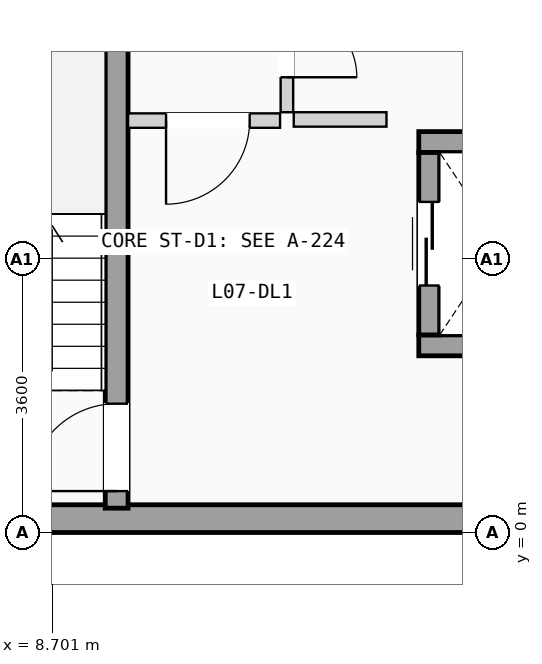
"""IFC4 building model, lengths in metres.
Left out: names, types, materials, properties, quantities, classifications, styles, units other than length and angle.
Written with IfcOpenShell. Run it as: python <this file> out.ifc"""

import sys

from ifc_helpers import new_model, si_unit, direction, frame, frame_2d, origin, place, context, subcontext, project, spatial, rectangle, extrude, element, fill, save


model = new_model("IFC4")
c1 = context("Model", 3, precision=1e-05, world=origin(), true_north=direction((0.0, 1.0)))
c2 = subcontext(c1, "Body", "Model", "MODEL_VIEW")
j1 = project(units=[si_unit("LENGTHUNIT", "METRE"), si_unit("PLANEANGLEUNIT", "RADIAN")], contexts=[c1])
p1 = place(None, origin())
s1 = spatial("IfcSite", under=j1, at=p1, CompositionType="ELEMENT")
p2 = place(p1, origin())
s2 = spatial("IfcBuilding", under=s1, at=p2, CompositionType="ELEMENT")
p3 = place(p2, frame((0.0, 0.0, 24.675)))
s3 = spatial("IfcBuildingStorey", under=s2, at=p3, CompositionType="ELEMENT", Elevation=24.675)
p4 = place(p3, frame((0.0, 0.183, 0.0), z_axis=(0.0, 0.0, 1.0), x_axis=(1.0, 0.0, 0.0)))
e1 = element("IfcWall", 1, at=p4, inside=s3, PredefinedType="SOLIDWALL", context=c2, shape_type="SweptSolid", body=[
    extrude(rectangle(XDim=21.6, YDim=0.365, at=frame_2d((10.8, 0.0))), origin(), (0.0, 0.0, 1.0), 2.6),
])
p5 = place(p3, frame((9.55, 0.32, 0.0), z_axis=(0.0, 0.0, 1.0), x_axis=(0.0, 1.0, 0.0)))
e2 = element("IfcWall", 2, at=p5, inside=s3, PredefinedType="SHEAR", context=c2, shape_type="SweptSolid", body=[
    extrude(rectangle(XDim=7.0, YDim=0.3, at=frame_2d((3.5, 0.0))), origin(), (0.0, 0.0, 1.0), 2.9),
])
p6 = place(p5, frame((0.225, 0.0, 0.0)))
e3 = element("IfcOpeningElement", 3, at=p6, cuts=e2, PredefinedType="OPENING", context=c2, shape_type="SweptSolid", body=[
    extrude(rectangle(XDim=1.15, YDim=2.12, at=frame_2d((0.575, 1.06))), frame((0.0, 0.16, 0.0), z_axis=(0.0, -1.0, 0.0), x_axis=(1.0, 0.0, 0.0)), (0.0, 0.0, 1.0), 0.32),
])
for number, where, z_axis, x_axis in (
    (4, (13.525, 2.462, 0.0), (0.0, 0.0, 1.0), (1.0, 0.0, 0.0)),
    (5, (13.525, 5.137, 0.0), (0.0, 0.0, 1.0), (1.0, 0.0, 0.0)),
):
    element("IfcWall", number, at=place(p3, frame(where, z_axis=z_axis, x_axis=x_axis)), inside=s3, PredefinedType="SHEAR", context=c2, shape_type="SweptSolid", body=[
        extrude(rectangle(XDim=2.15, YDim=0.275, at=frame_2d((1.075, 0.0))), origin(), (0.0, 0.0, 1.0), 2.9),
    ])
p7 = place(p3, frame((13.663, 2.6, 0.0), z_axis=(0.0, 0.0, 1.0), x_axis=(0.0, 1.0, 0.0)))
e6 = element("IfcWall", 6, at=p7, inside=s3, PredefinedType="SHEAR", context=c2, shape_type="SweptSolid", body=[
    extrude(rectangle(XDim=2.4, YDim=0.275, at=frame_2d((1.2, 0.0))), origin(), (0.0, 0.0, 1.0), 2.9),
])
p8 = place(p7, frame((0.65, 0.0, 0.0)))
e7 = element("IfcOpeningElement", 7, at=p8, cuts=e6, PredefinedType="OPENING", context=c2, shape_type="SweptSolid", body=[
    extrude(rectangle(XDim=1.1, YDim=2.15, at=frame_2d((0.55, 1.075))), frame((0.0, 0.147, 0.0), z_axis=(0.0, -1.0, 0.0), x_axis=(1.0, 0.0, 0.0)), (0.0, 0.0, 1.0), 0.295),
])
p9 = place(p3, frame((11.88, 5.435, 0.0), z_axis=(0.0, 0.0, 1.0), x_axis=(1.0, 0.0, 0.0)))
e8 = element("IfcWall", 8, at=p9, inside=s3, PredefinedType="PARTITIONING", context=c2, shape_type="SweptSolid", body=[
    extrude(rectangle(XDim=1.22, YDim=0.19, at=frame_2d((0.61, 0.0))), origin(), (0.0, 0.0, 1.0), 2.87),
])
p10 = place(p3, frame((9.7, 5.42, 0.0), z_axis=(0.0, 0.0, 1.0), x_axis=(1.0, 0.0, 0.0)))
e9 = element("IfcWall", 9, at=p10, inside=s3, PredefinedType="PARTITIONING", context=c2, shape_type="SweptSolid", body=[
    extrude(rectangle(XDim=2.0, YDim=0.19, at=frame_2d((1.0, 0.0))), origin(), (0.0, 0.0, 1.0), 2.87),
])
p11 = place(p10, frame((0.5, 0.0, 0.0)))
e10 = element("IfcOpeningElement", 10, at=p11, cuts=e9, PredefinedType="OPENING", context=c2, shape_type="SweptSolid", body=[
    extrude(rectangle(XDim=1.1, YDim=2.12, at=frame_2d((0.55, 1.06))), frame((0.0, 0.105, 0.0), z_axis=(0.0, -1.0, 0.0), x_axis=(1.0, 0.0, 0.0)), (0.0, 0.0, 1.0), 0.21),
])
p12 = place(p3, frame((11.79, 5.53, 0.0), z_axis=(0.0, 0.0, 1.0), x_axis=(0.0, 1.0, 0.0)))
e11 = element("IfcWall", 11, at=p12, inside=s3, PredefinedType="PARTITIONING", context=c2, shape_type="SweptSolid", body=[
    extrude(rectangle(XDim=1.82, YDim=0.165, at=frame_2d((0.91, 0.0))), origin(), (0.0, 0.0, 1.0), 2.87),
])
p13 = place(p12, frame((0.46, 0.0, 0.0)))
e12 = element("IfcOpeningElement", 12, at=p13, cuts=e11, PredefinedType="OPENING", context=c2, shape_type="SweptSolid", body=[
    extrude(rectangle(XDim=0.92, YDim=2.04, at=frame_2d((0.46, 1.02))), frame((0.0, 0.093, 0.0), z_axis=(0.0, -1.0, 0.0), x_axis=(1.0, 0.0, 0.0)), (0.0, 0.0, 1.0), 0.185),
])
p14 = place(p6, origin())
e13 = element("IfcDoor", 13, at=p14, inside=s3, OperationType="SINGLE_SWING_LEFT", PredefinedType="DOOR", context=c2, shape_type="SweptSolid", body=[
    extrude(rectangle(XDim=1.15, YDim=2.12, at=frame_2d((0.575, 1.06))), frame((0.0, 0.025, 0.0), z_axis=(0.0, -1.0, 0.0), x_axis=(1.0, 0.0, 0.0)), (0.0, 0.0, 1.0), 0.05),
])
fill(e3, e13)
p15 = place(p8, origin())
e14 = element("IfcDoor", 14, at=p15, inside=s3, OperationType="SLIDING_TO_LEFT", PredefinedType="DOOR", context=c2, shape_type="SweptSolid", body=[
    extrude(rectangle(XDim=1.1, YDim=2.15, at=frame_2d((0.55, 1.075))), frame((0.0, 0.025, 0.0), z_axis=(0.0, -1.0, 0.0), x_axis=(1.0, 0.0, 0.0)), (0.0, 0.0, 1.0), 0.05),
])
fill(e7, e14)
p16 = place(p11, frame((1.1, 0.0, 0.0), z_axis=(0.0, 0.0, 1.0), x_axis=(-1.0, 0.0, 0.0)))
e15 = element("IfcDoor", 15, at=p16, inside=s3, OperationType="SINGLE_SWING_LEFT", PredefinedType="DOOR", context=c2, shape_type="SweptSolid", body=[
    extrude(rectangle(XDim=1.1, YDim=2.12, at=frame_2d((0.55, 1.06))), frame((0.0, 0.025, 0.0), z_axis=(0.0, -1.0, 0.0), x_axis=(1.0, 0.0, 0.0)), (0.0, 0.0, 1.0), 0.05),
])
fill(e10, e15)
p17 = place(p13, frame((0.92, 0.0, 0.0), z_axis=(0.0, 0.0, 1.0), x_axis=(-1.0, 0.0, 0.0)))
e16 = element("IfcDoor", 16, at=p17, inside=s3, OperationType="SINGLE_SWING_LEFT", PredefinedType="DOOR", context=c2, shape_type="SweptSolid", body=[
    extrude(rectangle(XDim=0.92, YDim=2.04, at=frame_2d((0.46, 1.02))), frame((0.0, 0.025, 0.0), z_axis=(0.0, -1.0, 0.0), x_axis=(1.0, 0.0, 0.0)), (0.0, 0.0, 1.0), 0.05),
])
fill(e12, e16)
save(model, sys.argv[1])
